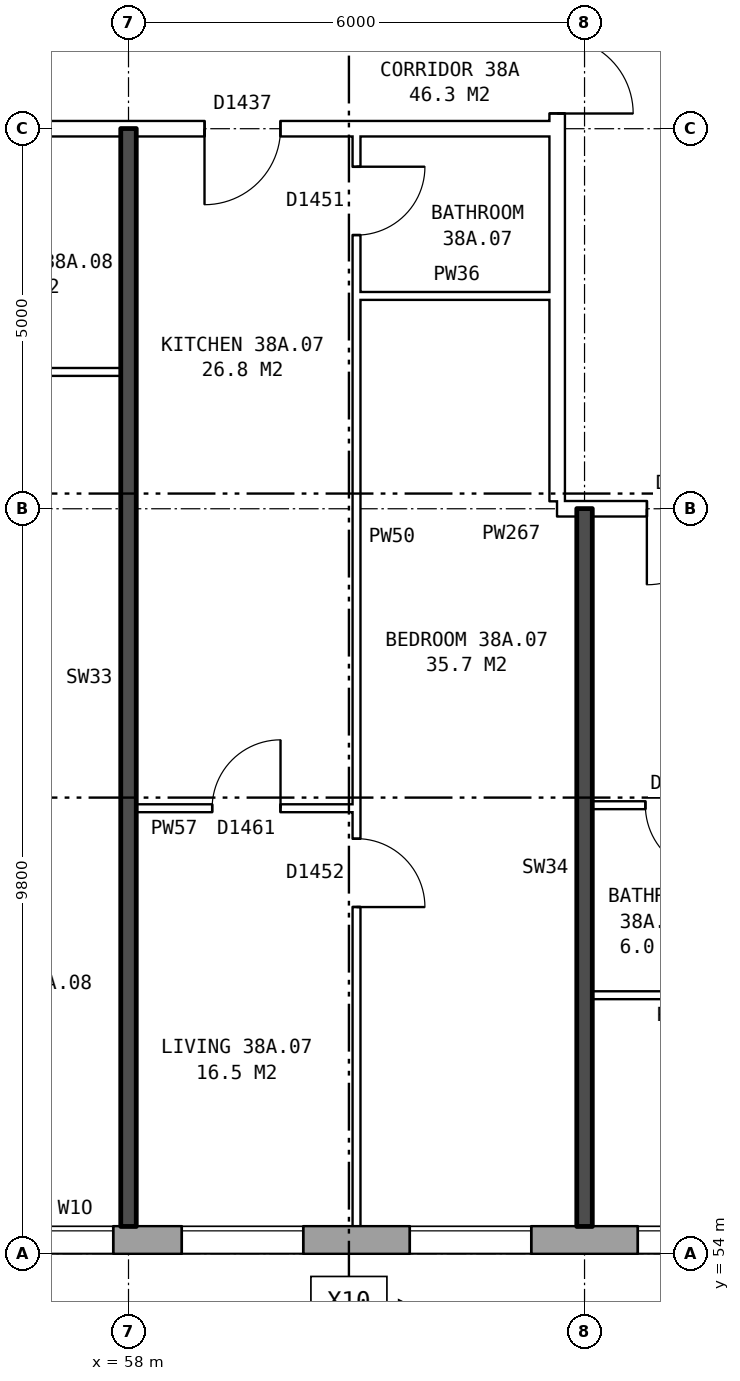
"""IFC4 building model, lengths in metres.
Left out: names, types, materials, properties, quantities, classifications, styles, units other than length and angle.
Written with IfcOpenShell. Run it as: python <this file> out.ifc"""

import sys

from ifc_helpers import new_model, si_unit, direction, frame, frame_2d, origin, place, context, subcontext, project, spatial, rectangle, extrude, element, fill, save


model = new_model("IFC4")
c1 = context("Model", 3, precision=1e-05, world=origin(), true_north=direction((0.0, 1.0)))
c2 = subcontext(c1, "Body", "Model", "MODEL_VIEW")
j1 = project(units=[si_unit("LENGTHUNIT", "METRE"), si_unit("PLANEANGLEUNIT", "RADIAN")], contexts=[c1])
p1 = place(None, origin())
s1 = spatial("IfcSite", under=j1, at=p1, CompositionType="ELEMENT")
p2 = place(p1, origin())
s2 = spatial("IfcBuilding", under=s1, at=p2, CompositionType="ELEMENT")
p3 = place(p2, frame((0.0, 0.0, 136.1)))
s3 = spatial("IfcBuildingStorey", under=s2, at=p3, CompositionType="ELEMENT", Elevation=136.1)
p4 = place(p3, frame((29.825, 54.18, 0.0), z_axis=(0.0, 0.0, 1.0), x_axis=(1.0, 0.0, 0.0)))
e1 = element("IfcWall", 1, at=p4, inside=s3, PredefinedType="STANDARD", context=c2, shape_type="SweptSolid", body=[
    extrude(rectangle(XDim=43.101, YDim=0.36, at=frame_2d((21.55, 0.0))), origin(), (0.0, 0.0, 1.0), 2.85),
])
p5 = place(p4, frame((1.875, 0.0, 0.8)))
e2 = element("IfcOpeningElement", 2, at=p5, cuts=e1, PredefinedType="OPENING", context=c2, shape_type="SweptSolid", body=[
    extrude(rectangle(XDim=1.6, YDim=1.8, at=frame_2d((0.8, 0.9))), frame((0.0, 0.19, 0.0), z_axis=(0.0, -1.0, 0.0), x_axis=(1.0, 0.0, 0.0)), (0.0, 0.0, 1.0), 0.38),
])
p6 = place(p4, frame((4.875, 0.0, 0.8)))
e3 = element("IfcOpeningElement", 3, at=p6, cuts=e1, PredefinedType="OPENING", context=c2, shape_type="SweptSolid", body=[
    extrude(rectangle(XDim=1.6, YDim=1.8, at=frame_2d((0.8, 0.9))), frame((0.0, 0.19, 0.0), z_axis=(0.0, -1.0, 0.0), x_axis=(1.0, 0.0, 0.0)), (0.0, 0.0, 1.0), 0.38),
])
p7 = place(p4, frame((7.875, 0.0, 0.8)))
e4 = element("IfcOpeningElement", 4, at=p7, cuts=e1, PredefinedType="OPENING", context=c2, shape_type="SweptSolid", body=[
    extrude(rectangle(XDim=1.6, YDim=1.8, at=frame_2d((0.8, 0.9))), frame((0.0, 0.19, 0.0), z_axis=(0.0, -1.0, 0.0), x_axis=(1.0, 0.0, 0.0)), (0.0, 0.0, 1.0), 0.38),
])
p8 = place(p4, frame((10.875, 0.0, 0.8)))
e5 = element("IfcOpeningElement", 5, at=p8, cuts=e1, PredefinedType="OPENING", context=c2, shape_type="SweptSolid", body=[
    extrude(rectangle(XDim=1.6, YDim=1.8, at=frame_2d((0.8, 0.9))), frame((0.0, 0.19, 0.0), z_axis=(0.0, -1.0, 0.0), x_axis=(1.0, 0.0, 0.0)), (0.0, 0.0, 1.0), 0.38),
])
p9 = place(p4, frame((13.875, 0.0, 0.8)))
e6 = element("IfcOpeningElement", 6, at=p9, cuts=e1, PredefinedType="OPENING", context=c2, shape_type="SweptSolid", body=[
    extrude(rectangle(XDim=1.6, YDim=1.8, at=frame_2d((0.8, 0.9))), frame((0.0, 0.19, 0.0), z_axis=(0.0, -1.0, 0.0), x_axis=(1.0, 0.0, 0.0)), (0.0, 0.0, 1.0), 0.38),
])
p10 = place(p4, frame((16.975, 0.0, 0.15)))
e7 = element("IfcOpeningElement", 7, at=p10, cuts=e1, PredefinedType="OPENING", context=c2, shape_type="SweptSolid", body=[
    extrude(rectangle(XDim=0.6, YDim=0.9, at=frame_2d((0.3, 0.45))), frame((0.0, 0.19, 0.0), z_axis=(0.0, -1.0, 0.0), x_axis=(1.0, 0.0, 0.0)), (0.0, 0.0, 1.0), 0.38),
])
p11 = place(p4, frame((19.875, 0.0, 0.8)))
e8 = element("IfcOpeningElement", 8, at=p11, cuts=e1, PredefinedType="OPENING", context=c2, shape_type="SweptSolid", body=[
    extrude(rectangle(XDim=1.6, YDim=1.8, at=frame_2d((0.8, 0.9))), frame((0.0, 0.19, 0.0), z_axis=(0.0, -1.0, 0.0), x_axis=(1.0, 0.0, 0.0)), (0.0, 0.0, 1.0), 0.38),
])
p12 = place(p4, frame((22.875, 0.0, 0.8)))
e9 = element("IfcOpeningElement", 9, at=p12, cuts=e1, PredefinedType="OPENING", context=c2, shape_type="SweptSolid", body=[
    extrude(rectangle(XDim=1.6, YDim=1.8, at=frame_2d((0.8, 0.9))), frame((0.0, 0.19, 0.0), z_axis=(0.0, -1.0, 0.0), x_axis=(1.0, 0.0, 0.0)), (0.0, 0.0, 1.0), 0.38),
])
p13 = place(p4, frame((25.325, 0.0, 0.15)))
e10 = element("IfcOpeningElement", 10, at=p13, cuts=e1, PredefinedType="OPENING", context=c2, shape_type="SweptSolid", body=[
    extrude(rectangle(XDim=0.8, YDim=0.9, at=frame_2d((0.4, 0.45))), frame((0.0, 0.19, 0.0), z_axis=(0.0, -1.0, 0.0), x_axis=(1.0, 0.0, 0.0)), (0.0, 0.0, 1.0), 0.38),
])
p14 = place(p4, frame((28.875, 0.0, 0.8)))
e11 = element("IfcOpeningElement", 11, at=p14, cuts=e1, PredefinedType="OPENING", context=c2, shape_type="SweptSolid", body=[
    extrude(rectangle(XDim=1.6, YDim=1.8, at=frame_2d((0.8, 0.9))), frame((0.0, 0.19, 0.0), z_axis=(0.0, -1.0, 0.0), x_axis=(1.0, 0.0, 0.0)), (0.0, 0.0, 1.0), 0.38),
])
p15 = place(p4, frame((31.875, 0.0, 0.8)))
e12 = element("IfcOpeningElement", 12, at=p15, cuts=e1, PredefinedType="OPENING", context=c2, shape_type="SweptSolid", body=[
    extrude(rectangle(XDim=1.6, YDim=1.8, at=frame_2d((0.8, 0.9))), frame((0.0, 0.19, 0.0), z_axis=(0.0, -1.0, 0.0), x_axis=(1.0, 0.0, 0.0)), (0.0, 0.0, 1.0), 0.38),
])
p16 = place(p4, frame((34.875, 0.0, 0.8)))
e13 = element("IfcOpeningElement", 13, at=p16, cuts=e1, PredefinedType="OPENING", context=c2, shape_type="SweptSolid", body=[
    extrude(rectangle(XDim=1.6, YDim=1.8, at=frame_2d((0.8, 0.9))), frame((0.0, 0.19, 0.0), z_axis=(0.0, -1.0, 0.0), x_axis=(1.0, 0.0, 0.0)), (0.0, 0.0, 1.0), 0.38),
])
p17 = place(p4, frame((37.875, 0.0, 0.8)))
e14 = element("IfcOpeningElement", 14, at=p17, cuts=e1, PredefinedType="OPENING", context=c2, shape_type="SweptSolid", body=[
    extrude(rectangle(XDim=1.6, YDim=1.8, at=frame_2d((0.8, 0.9))), frame((0.0, 0.19, 0.0), z_axis=(0.0, -1.0, 0.0), x_axis=(1.0, 0.0, 0.0)), (0.0, 0.0, 1.0), 0.38),
])
p18 = place(p4, frame((40.875, 0.0, 0.8)))
e15 = element("IfcOpeningElement", 15, at=p18, cuts=e1, PredefinedType="OPENING", context=c2, shape_type="SweptSolid", body=[
    extrude(rectangle(XDim=1.6, YDim=1.8, at=frame_2d((0.8, 0.9))), frame((0.0, 0.19, 0.0), z_axis=(0.0, -1.0, 0.0), x_axis=(1.0, 0.0, 0.0)), (0.0, 0.0, 1.0), 0.38),
])
p19 = place(p4, frame((17.925, 0.0, 0.15)))
e16 = element("IfcOpeningElement", 16, at=p19, cuts=e1, PredefinedType="OPENING", context=c2, shape_type="SweptSolid", body=[
    extrude(rectangle(XDim=1.0, YDim=1.8, at=frame_2d((0.5, 0.9))), frame((0.0, 0.19, 0.0), z_axis=(0.0, -1.0, 0.0), x_axis=(1.0, 0.0, 0.0)), (0.0, 0.0, 1.0), 0.38),
])
p20 = place(p4, frame((26.975, 0.0, 1.35)))
e17 = element("IfcOpeningElement", 17, at=p20, cuts=e1, PredefinedType="OPENING", context=c2, shape_type="SweptSolid", body=[
    extrude(rectangle(XDim=1.0, YDim=1.2, at=frame_2d((0.5, 0.6))), frame((0.0, 0.19, 0.0), z_axis=(0.0, -1.0, 0.0), x_axis=(1.0, 0.0, 0.0)), (0.0, 0.0, 1.0), 0.38),
])
p21 = place(p3, frame((63.64, 63.9, 0.0), z_axis=(0.0, 0.0, 1.0), x_axis=(0.0, 1.0, 0.0)))
e18 = element("IfcWall", 18, at=p21, inside=s3, PredefinedType="PARTITIONING", context=c2, shape_type="SweptSolid", body=[
    extrude(rectangle(XDim=12.2, YDim=0.2, at=frame_2d((6.1, 0.0))), origin(), (0.0, 0.0, 1.0), 2.85),
])
p22 = place(p21, frame((5.1, 0.0, 0.0)))
e19 = element("IfcOpeningElement", 19, at=p22, cuts=e18, PredefinedType="OPENING", context=c2, shape_type="SweptSolid", body=[
    extrude(rectangle(XDim=2.0, YDim=2.1, at=frame_2d((1.0, 1.05))), frame((0.0, 0.11, 0.0), z_axis=(0.0, -1.0, 0.0), x_axis=(1.0, 0.0, 0.0)), (0.0, 0.0, 1.0), 0.22),
])
p23 = place(p3, frame((64.1, 57.4, 0.0), z_axis=(0.0, 0.0, 1.0), x_axis=(1.0, 0.0, 0.0)))
e20 = element("IfcWall", 20, at=p23, inside=s3, PredefinedType="PARTITIONING", context=c2, shape_type="SweptSolid", body=[
    extrude(rectangle(XDim=2.3, YDim=0.1, at=frame_2d((1.15, 0.0))), origin(), (0.0, 0.0, 1.0), 2.85),
])
p24 = place(p3, frame((58.1, 59.86, 0.0), z_axis=(0.0, 0.0, 1.0), x_axis=(1.0, 0.0, 0.0)))
e21 = element("IfcWall", 21, at=p24, inside=s3, PredefinedType="PARTITIONING", context=c2, shape_type="SweptSolid", body=[
    extrude(rectangle(XDim=2.9, YDim=0.1, at=frame_2d((1.45, 0.0))), origin(), (0.0, 0.0, 1.0), 2.85),
])
p25 = place(p24, frame((1.0, 0.0, 0.0)))
e22 = element("IfcOpeningElement", 22, at=p25, cuts=e21, PredefinedType="OPENING", context=c2, shape_type="SweptSolid", body=[
    extrude(rectangle(XDim=0.9, YDim=2.1, at=frame_2d((0.45, 1.05))), frame((0.0, 0.06, 0.0), z_axis=(0.0, -1.0, 0.0), x_axis=(1.0, 0.0, 0.0)), (0.0, 0.0, 1.0), 0.12),
])
p26 = place(p3, frame((64.1, 59.9, 0.0), z_axis=(0.0, 0.0, 1.0), x_axis=(1.0, 0.0, 0.0)))
e23 = element("IfcWall", 23, at=p26, inside=s3, PredefinedType="PARTITIONING", context=c2, shape_type="SweptSolid", body=[
    extrude(rectangle(XDim=5.8, YDim=0.1, at=frame_2d((2.9, 0.0))), origin(), (0.0, 0.0, 1.0), 2.85),
])
p27 = place(p26, frame((3.6, 0.0, 0.0)))
e24 = element("IfcOpeningElement", 24, at=p27, cuts=e23, PredefinedType="OPENING", context=c2, shape_type="SweptSolid", body=[
    extrude(rectangle(XDim=0.9, YDim=2.1, at=frame_2d((0.45, 1.05))), frame((0.0, 0.06, 0.0), z_axis=(0.0, -1.0, 0.0), x_axis=(1.0, 0.0, 0.0)), (0.0, 0.0, 1.0), 0.12),
])
p28 = place(p26, frame((0.7, 0.0, 0.0)))
e25 = element("IfcOpeningElement", 25, at=p28, cuts=e23, PredefinedType="OPENING", context=c2, shape_type="SweptSolid", body=[
    extrude(rectangle(XDim=0.9, YDim=2.1, at=frame_2d((0.45, 1.05))), frame((0.0, 0.06, 0.0), z_axis=(0.0, -1.0, 0.0), x_axis=(1.0, 0.0, 0.0)), (0.0, 0.0, 1.0), 0.12),
])
p29 = place(p3, frame((63.64, 63.8, 0.0), z_axis=(0.0, 0.0, 1.0), x_axis=(1.0, 0.0, 0.0)))
e26 = element("IfcWall", 26, at=p29, inside=s3, PredefinedType="PARTITIONING", context=c2, shape_type="SweptSolid", body=[
    extrude(rectangle(XDim=3.0, YDim=0.2, at=frame_2d((1.5, 0.0))), origin(), (0.0, 0.0, 1.0), 2.85),
])
p30 = place(p29, frame((1.18, 0.0, 0.0)))
e27 = element("IfcOpeningElement", 27, at=p30, cuts=e26, PredefinedType="OPENING", context=c2, shape_type="SweptSolid", body=[
    extrude(rectangle(XDim=1.0, YDim=2.1, at=frame_2d((0.5, 1.05))), frame((0.0, 0.11, 0.0), z_axis=(0.0, -1.0, 0.0), x_axis=(1.0, 0.0, 0.0)), (0.0, 0.0, 1.0), 0.22),
])
p31 = place(p3, frame((55.0, 65.6, 0.0), z_axis=(0.0, 0.0, 1.0), x_axis=(1.0, 0.0, 0.0)))
e28 = element("IfcWall", 28, at=p31, inside=s3, PredefinedType="PARTITIONING", context=c2, shape_type="SweptSolid", body=[
    extrude(rectangle(XDim=2.9, YDim=0.1, at=frame_2d((1.45, 0.0))), origin(), (0.0, 0.0, 1.0), 2.85),
])
p32 = place(p3, frame((61.0, 66.6, 0.0), z_axis=(0.0, 0.0, 1.0), x_axis=(1.0, 0.0, 0.0)))
e29 = element("IfcWall", 29, at=p32, inside=s3, PredefinedType="PARTITIONING", context=c2, shape_type="SweptSolid", body=[
    extrude(rectangle(XDim=2.64, YDim=0.1, at=frame_2d((1.32, 0.0))), origin(), (0.0, 0.0, 1.0), 2.85),
])
p33 = place(p3, frame((44.36, 68.8, 0.0), z_axis=(0.0, 0.0, 1.0), x_axis=(1.0, 0.0, 0.0)))
e30 = element("IfcWall", 30, at=p33, inside=s3, PredefinedType="PARTITIONING", context=c2, shape_type="SweptSolid", body=[
    extrude(rectangle(XDim=19.28, YDim=0.2, at=frame_2d((9.64, 0.0))), origin(), (0.0, 0.0, 1.0), 2.85),
])
p34 = place(p33, frame((14.64, 0.0, 0.0)))
e31 = element("IfcOpeningElement", 31, at=p34, cuts=e30, PredefinedType="OPENING", context=c2, shape_type="SweptSolid", body=[
    extrude(rectangle(XDim=1.0, YDim=2.1, at=frame_2d((0.5, 1.05))), frame((0.0, 0.11, 0.0), z_axis=(0.0, -1.0, 0.0), x_axis=(1.0, 0.0, 0.0)), (0.0, 0.0, 1.0), 0.22),
])
p35 = place(p33, frame((8.64, 0.0, 0.0)))
e32 = element("IfcOpeningElement", 32, at=p35, cuts=e30, PredefinedType="OPENING", context=c2, shape_type="SweptSolid", body=[
    extrude(rectangle(XDim=1.0, YDim=2.1, at=frame_2d((0.5, 1.05))), frame((0.0, 0.11, 0.0), z_axis=(0.0, -1.0, 0.0), x_axis=(1.0, 0.0, 0.0)), (0.0, 0.0, 1.0), 0.22),
])
p36 = place(p33, frame((2.64, 0.0, 0.0)))
e33 = element("IfcOpeningElement", 33, at=p36, cuts=e30, PredefinedType="OPENING", context=c2, shape_type="SweptSolid", body=[
    extrude(rectangle(XDim=1.0, YDim=2.1, at=frame_2d((0.5, 1.05))), frame((0.0, 0.11, 0.0), z_axis=(0.0, -1.0, 0.0), x_axis=(1.0, 0.0, 0.0)), (0.0, 0.0, 1.0), 0.22),
])
p37 = place(p3, frame((58.0, 54.36, 0.0), z_axis=(0.0, 0.0, 1.0), x_axis=(0.0, 1.0, 0.0)))
e34 = element("IfcWall", 34, at=p37, inside=s3, PredefinedType="SOLIDWALL", context=c2, shape_type="SweptSolid", body=[
    extrude(rectangle(XDim=14.44, YDim=0.2, at=frame_2d((7.22, 0.0))), origin(), (0.0, 0.0, 1.0), 2.85),
])
p38 = place(p3, frame((61.0, 54.36, 0.0), z_axis=(0.0, 0.0, 1.0), x_axis=(0.0, 1.0, 0.0)))
e35 = element("IfcWall", 35, at=p38, inside=s3, PredefinedType="PARTITIONING", context=c2, shape_type="SweptSolid", body=[
    extrude(rectangle(XDim=14.34, YDim=0.1, at=frame_2d((7.17, 0.0))), origin(), (0.0, 0.0, 1.0), 2.85),
])
p39 = place(p38, frame((4.2, 0.0, 0.0)))
e36 = element("IfcOpeningElement", 36, at=p39, cuts=e35, PredefinedType="OPENING", context=c2, shape_type="SweptSolid", body=[
    extrude(rectangle(XDim=0.9, YDim=2.1, at=frame_2d((0.45, 1.05))), frame((0.0, 0.06, 0.0), z_axis=(0.0, -1.0, 0.0), x_axis=(1.0, 0.0, 0.0)), (0.0, 0.0, 1.0), 0.12),
])
p40 = place(p38, frame((13.04, 0.0, 0.0)))
e37 = element("IfcOpeningElement", 37, at=p40, cuts=e35, PredefinedType="OPENING", context=c2, shape_type="SweptSolid", body=[
    extrude(rectangle(XDim=0.9, YDim=2.1, at=frame_2d((0.45, 1.05))), frame((0.0, 0.06, 0.0), z_axis=(0.0, -1.0, 0.0), x_axis=(1.0, 0.0, 0.0)), (0.0, 0.0, 1.0), 0.12),
])
p41 = place(p3, frame((64.0, 54.36, 0.0), z_axis=(0.0, 0.0, 1.0), x_axis=(0.0, 1.0, 0.0)))
e38 = element("IfcWall", 38, at=p41, inside=s3, PredefinedType="SOLIDWALL", context=c2, shape_type="SweptSolid", body=[
    extrude(rectangle(XDim=9.44, YDim=0.2, at=frame_2d((4.72, 0.0))), origin(), (0.0, 0.0, 1.0), 2.85),
])
p42 = place(p14, origin())
e39 = element("IfcWindow", 39, at=p42, inside=s3, PartitioningType="SINGLE_PANEL", PredefinedType="WINDOW", context=c2, shape_type="SweptSolid", body=[
    extrude(rectangle(XDim=1.6, YDim=1.8, at=frame_2d((0.8, 0.9))), frame((0.0, 0.15, 0.0), z_axis=(0.0, -1.0, 0.0), x_axis=(1.0, 0.0, 0.0)), (0.0, 0.0, 1.0), 0.06),
])
fill(e11, e39)
p43 = place(p15, origin())
e40 = element("IfcWindow", 40, at=p43, inside=s3, PartitioningType="SINGLE_PANEL", PredefinedType="WINDOW", context=c2, shape_type="SweptSolid", body=[
    extrude(rectangle(XDim=1.6, YDim=1.8, at=frame_2d((0.8, 0.9))), frame((0.0, 0.15, 0.0), z_axis=(0.0, -1.0, 0.0), x_axis=(1.0, 0.0, 0.0)), (0.0, 0.0, 1.0), 0.06),
])
fill(e12, e40)
p44 = place(p16, origin())
e41 = element("IfcWindow", 41, at=p44, inside=s3, PartitioningType="SINGLE_PANEL", PredefinedType="WINDOW", context=c2, shape_type="SweptSolid", body=[
    extrude(rectangle(XDim=1.6, YDim=1.8, at=frame_2d((0.8, 0.9))), frame((0.0, 0.15, 0.0), z_axis=(0.0, -1.0, 0.0), x_axis=(1.0, 0.0, 0.0)), (0.0, 0.0, 1.0), 0.06),
])
fill(e13, e41)
p45 = place(p22, frame((2.0, 0.0, 0.0), z_axis=(0.0, 0.0, 1.0), x_axis=(-1.0, 0.0, 0.0)))
e42 = element("IfcDoor", 42, at=p45, inside=s3, OperationType="DOUBLE_DOOR_SINGLE_SWING", PredefinedType="DOOR", context=c2, shape_type="SweptSolid", body=[
    extrude(rectangle(XDim=2.0, YDim=2.1, at=frame_2d((1.0, 1.05))), frame((0.0, 0.025, 0.0), z_axis=(0.0, -1.0, 0.0), x_axis=(1.0, 0.0, 0.0)), (0.0, 0.0, 1.0), 0.05),
])
fill(e19, e42)
p46 = place(p30, frame((1.0, 0.0, 0.0), z_axis=(0.0, 0.0, 1.0), x_axis=(-1.0, 0.0, 0.0)))
e43 = element("IfcDoor", 43, at=p46, inside=s3, OperationType="SINGLE_SWING_RIGHT", PredefinedType="DOOR", context=c2, shape_type="SweptSolid", body=[
    extrude(rectangle(XDim=1.0, YDim=2.1, at=frame_2d((0.5, 1.05))), frame((0.0, 0.025, 0.0), z_axis=(0.0, -1.0, 0.0), x_axis=(1.0, 0.0, 0.0)), (0.0, 0.0, 1.0), 0.05),
])
fill(e27, e43)
p47 = place(p28, frame((0.9, 0.0, 0.0), z_axis=(0.0, 0.0, 1.0), x_axis=(-1.0, 0.0, 0.0)))
e44 = element("IfcDoor", 44, at=p47, inside=s3, OperationType="SINGLE_SWING_LEFT", PredefinedType="DOOR", context=c2, shape_type="SweptSolid", body=[
    extrude(rectangle(XDim=0.9, YDim=2.1, at=frame_2d((0.45, 1.05))), frame((0.0, 0.025, 0.0), z_axis=(0.0, -1.0, 0.0), x_axis=(1.0, 0.0, 0.0)), (0.0, 0.0, 1.0), 0.05),
])
fill(e25, e44)
p48 = place(p39, frame((0.9, 0.0, 0.0), z_axis=(0.0, 0.0, 1.0), x_axis=(-1.0, 0.0, 0.0)))
e45 = element("IfcDoor", 45, at=p48, inside=s3, OperationType="SINGLE_SWING_RIGHT", PredefinedType="DOOR", context=c2, shape_type="SweptSolid", body=[
    extrude(rectangle(XDim=0.9, YDim=2.1, at=frame_2d((0.45, 1.05))), frame((0.0, 0.025, 0.0), z_axis=(0.0, -1.0, 0.0), x_axis=(1.0, 0.0, 0.0)), (0.0, 0.0, 1.0), 0.05),
])
fill(e36, e45)
p49 = place(p34, frame((1.0, 0.0, 0.0), z_axis=(0.0, 0.0, 1.0), x_axis=(-1.0, 0.0, 0.0)))
e46 = element("IfcDoor", 46, at=p49, inside=s3, OperationType="SINGLE_SWING_RIGHT", PredefinedType="DOOR", context=c2, shape_type="SweptSolid", body=[
    extrude(rectangle(XDim=1.0, YDim=2.1, at=frame_2d((0.5, 1.05))), frame((0.0, 0.025, 0.0), z_axis=(0.0, -1.0, 0.0), x_axis=(1.0, 0.0, 0.0)), (0.0, 0.0, 1.0), 0.05),
])
fill(e31, e46)
p50 = place(p25, origin())
e47 = element("IfcDoor", 47, at=p50, inside=s3, OperationType="SINGLE_SWING_RIGHT", PredefinedType="DOOR", context=c2, shape_type="SweptSolid", body=[
    extrude(rectangle(XDim=0.9, YDim=2.1, at=frame_2d((0.45, 1.05))), frame((0.0, 0.025, 0.0), z_axis=(0.0, -1.0, 0.0), x_axis=(1.0, 0.0, 0.0)), (0.0, 0.0, 1.0), 0.05),
])
fill(e22, e47)
p51 = place(p40, frame((0.9, 0.0, 0.0), z_axis=(0.0, 0.0, 1.0), x_axis=(-1.0, 0.0, 0.0)))
e48 = element("IfcDoor", 48, at=p51, inside=s3, OperationType="SINGLE_SWING_LEFT", PredefinedType="DOOR", context=c2, shape_type="SweptSolid", body=[
    extrude(rectangle(XDim=0.9, YDim=2.1, at=frame_2d((0.45, 1.05))), frame((0.0, 0.025, 0.0), z_axis=(0.0, -1.0, 0.0), x_axis=(1.0, 0.0, 0.0)), (0.0, 0.0, 1.0), 0.05),
])
fill(e37, e48)
p52 = place(p20, origin())
e49 = element("IfcWindow", 49, at=p52, inside=s3, PartitioningType="SINGLE_PANEL", PredefinedType="WINDOW", context=c2, shape_type="SweptSolid", body=[
    extrude(rectangle(XDim=1.0, YDim=1.2, at=frame_2d((0.5, 0.6))), frame((0.0, 0.15, 0.0), z_axis=(0.0, -1.0, 0.0), x_axis=(1.0, 0.0, 0.0)), (0.0, 0.0, 1.0), 0.06),
])
fill(e17, e49)
save(model, sys.argv[1])
